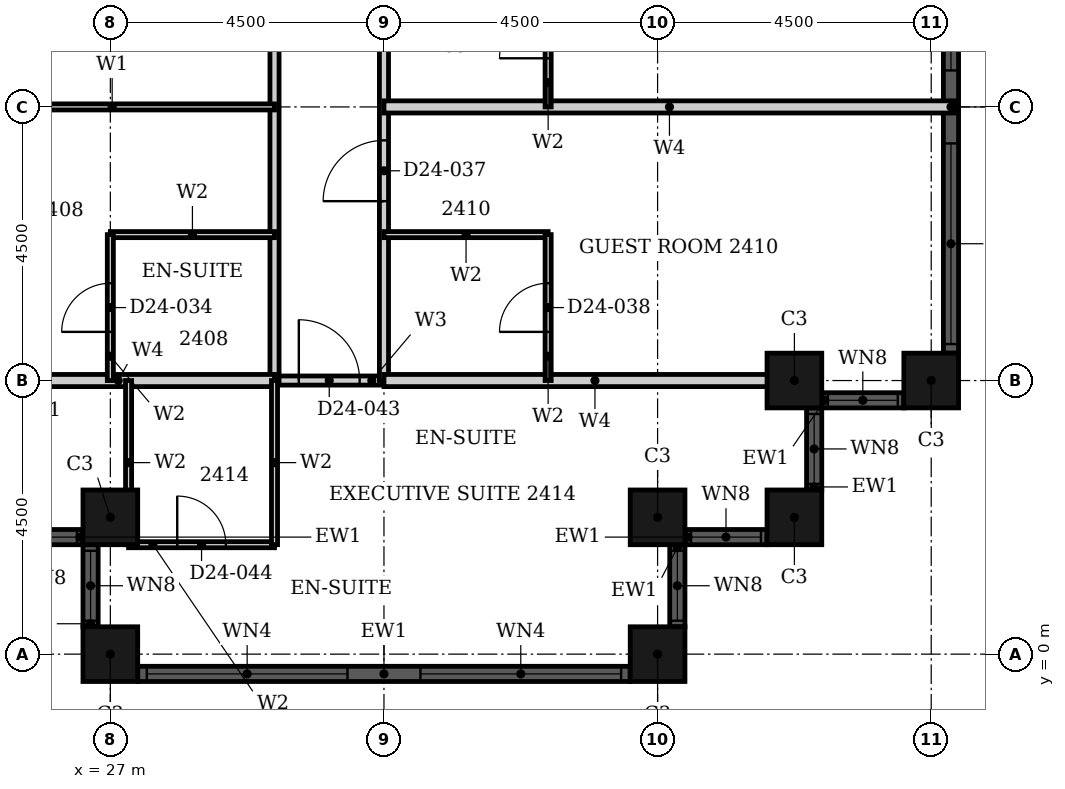
"""IFC4 building model, lengths in metres.
Left out: names, types, materials, properties, quantities, classifications, styles, units other than length and angle.
Written with IfcOpenShell. Run it as: python <this file> out.ifc"""

import sys

from ifc_helpers import new_model, si_unit, direction, frame, frame_2d, origin, origin_2d, place, context, subcontext, project, spatial, rectangle, hollow_rectangle, extrude, element, fill, save


model = new_model("IFC4")
c1 = context("Model", 3, precision=1e-05, world=origin(), true_north=direction((0.0, 1.0)))
c2 = subcontext(c1, "Body", "Model", "MODEL_VIEW")
j1 = project(units=[si_unit("LENGTHUNIT", "METRE"), si_unit("PLANEANGLEUNIT", "RADIAN")], contexts=[c1])
p1 = place(None, origin())
s1 = spatial("IfcSite", under=j1, at=p1, CompositionType="ELEMENT")
p2 = place(p1, origin())
s2 = spatial("IfcBuilding", under=s1, at=p2, CompositionType="ELEMENT")
p3 = place(p2, frame((0.0, 0.0, 100.8)))
s3 = spatial("IfcBuildingStorey", under=s2, at=p3, CompositionType="ELEMENT", Elevation=100.8)
for number, where, z_axis, x_axis in (
    (1, (27.0, 2.25, 0.0), (0.0, 0.0, 1.0), (1.0, 0.0, 0.0)),
    (2, (27.0, 0.0, 0.0), (0.0, 0.0, 1.0), (1.0, 0.0, 0.0)),
    (3, (36.0, 0.0, 0.0), (0.0, 0.0, 1.0), (1.0, 0.0, 0.0)),
    (4, (36.0, 2.25, 0.0), (0.0, 0.0, 1.0), (1.0, 0.0, 0.0)),
    (5, (38.25, 2.25, 0.0), (0.0, 0.0, 1.0), (1.0, 0.0, 0.0)),
    (6, (38.25, 4.5, 0.0), (0.0, 0.0, 1.0), (1.0, 0.0, 0.0)),
    (7, (40.5, 4.5, 0.0), (0.0, 0.0, 1.0), (1.0, 0.0, 0.0)),
):
    element("IfcColumn", number, at=place(p3, frame(where, z_axis=z_axis, x_axis=x_axis)), inside=s3, PredefinedType="COLUMN", context=c2, shape_type="SweptSolid", body=[
        extrude(hollow_rectangle(XDim=0.9, YDim=0.9, WallThickness=0.028, at=origin_2d()), origin(), (0.0, 0.0, 1.0), 3.6),
    ])
p4 = place(p3, frame((25.2, 1.925, 0.0), z_axis=(0.0, 0.0, 1.0), x_axis=(1.0, 0.0, 0.0)))
e8 = element("IfcWall", 8, at=p4, inside=s3, PredefinedType="SOLIDWALL", context=c2, shape_type="SweptSolid", body=[
    extrude(rectangle(XDim=1.35, YDim=0.25, at=frame_2d((0.675, 0.0))), origin(), (0.0, 0.0, 1.0), 3.6),
])
p5 = place(p4, frame((0.1, 0.0, 0.9)))
e9 = element("IfcOpeningElement", 9, at=p5, cuts=e8, PredefinedType="OPENING", context=c2, shape_type="SweptSolid", body=[
    extrude(rectangle(XDim=1.15, YDim=2.08, at=frame_2d((0.575, 1.04))), frame((0.0, 0.135, 0.0), z_axis=(0.0, -1.0, 0.0), x_axis=(1.0, 0.0, 0.0)), (0.0, 0.0, 1.0), 0.27),
])
p6 = place(p3, frame((26.675, 1.8, 0.0), z_axis=(0.0, 0.0, 1.0), x_axis=(0.0, -1.0, 0.0)))
e10 = element("IfcWall", 10, at=p6, inside=s3, PredefinedType="SOLIDWALL", context=c2, shape_type="SweptSolid", body=[
    extrude(rectangle(XDim=1.35, YDim=0.25, at=frame_2d((0.675, 0.0))), origin(), (0.0, 0.0, 1.0), 3.6),
])
p7 = place(p6, frame((0.1, 0.0, 0.9)))
e11 = element("IfcOpeningElement", 11, at=p7, cuts=e10, PredefinedType="OPENING", context=c2, shape_type="SweptSolid", body=[
    extrude(rectangle(XDim=1.15, YDim=2.08, at=frame_2d((0.575, 1.04))), frame((0.0, 0.135, 0.0), z_axis=(0.0, -1.0, 0.0), x_axis=(1.0, 0.0, 0.0)), (0.0, 0.0, 1.0), 0.27),
])
p8 = place(p3, frame((27.45, -0.325, 0.0), z_axis=(0.0, 0.0, 1.0), x_axis=(1.0, 0.0, 0.0)))
e12 = element("IfcWall", 12, at=p8, inside=s3, PredefinedType="SOLIDWALL", context=c2, shape_type="SweptSolid", body=[
    extrude(rectangle(XDim=8.1, YDim=0.25, at=frame_2d((4.05, 0.0))), origin(), (0.0, 0.0, 1.0), 3.6),
])
p9 = place(p8, frame((0.15, 0.0, 0.9)))
e13 = element("IfcOpeningElement", 13, at=p9, cuts=e12, PredefinedType="OPENING", context=c2, shape_type="SweptSolid", body=[
    extrude(rectangle(XDim=3.3, YDim=2.08, at=frame_2d((1.65, 1.04))), frame((0.0, 0.135, 0.0), z_axis=(0.0, -1.0, 0.0), x_axis=(1.0, 0.0, 0.0)), (0.0, 0.0, 1.0), 0.27),
])
p10 = place(p8, frame((4.65, 0.0, 0.9)))
e14 = element("IfcOpeningElement", 14, at=p10, cuts=e12, PredefinedType="OPENING", context=c2, shape_type="SweptSolid", body=[
    extrude(rectangle(XDim=3.3, YDim=2.08, at=frame_2d((1.65, 1.04))), frame((0.0, 0.135, 0.0), z_axis=(0.0, -1.0, 0.0), x_axis=(1.0, 0.0, 0.0)), (0.0, 0.0, 1.0), 0.27),
])
p11 = place(p3, frame((36.325, 0.45, 0.0), z_axis=(0.0, 0.0, 1.0), x_axis=(0.0, 1.0, 0.0)))
e15 = element("IfcWall", 15, at=p11, inside=s3, PredefinedType="SOLIDWALL", context=c2, shape_type="SweptSolid", body=[
    extrude(rectangle(XDim=1.35, YDim=0.25, at=frame_2d((0.675, 0.0))), origin(), (0.0, 0.0, 1.0), 3.6),
])
p12 = place(p11, frame((0.1, 0.0, 0.9)))
e16 = element("IfcOpeningElement", 16, at=p12, cuts=e15, PredefinedType="OPENING", context=c2, shape_type="SweptSolid", body=[
    extrude(rectangle(XDim=1.15, YDim=2.08, at=frame_2d((0.575, 1.04))), frame((0.0, 0.135, 0.0), z_axis=(0.0, -1.0, 0.0), x_axis=(1.0, 0.0, 0.0)), (0.0, 0.0, 1.0), 0.27),
])
p13 = place(p3, frame((36.45, 1.925, 0.0), z_axis=(0.0, 0.0, 1.0), x_axis=(1.0, 0.0, 0.0)))
e17 = element("IfcWall", 17, at=p13, inside=s3, PredefinedType="SOLIDWALL", context=c2, shape_type="SweptSolid", body=[
    extrude(rectangle(XDim=1.35, YDim=0.25, at=frame_2d((0.675, 0.0))), origin(), (0.0, 0.0, 1.0), 3.6),
])
p14 = place(p13, frame((0.1, 0.0, 0.9)))
e18 = element("IfcOpeningElement", 18, at=p14, cuts=e17, PredefinedType="OPENING", context=c2, shape_type="SweptSolid", body=[
    extrude(rectangle(XDim=1.15, YDim=2.08, at=frame_2d((0.575, 1.04))), frame((0.0, 0.135, 0.0), z_axis=(0.0, -1.0, 0.0), x_axis=(1.0, 0.0, 0.0)), (0.0, 0.0, 1.0), 0.27),
])
p15 = place(p3, frame((38.575, 2.7, 0.0), z_axis=(0.0, 0.0, 1.0), x_axis=(0.0, 1.0, 0.0)))
e19 = element("IfcWall", 19, at=p15, inside=s3, PredefinedType="SOLIDWALL", context=c2, shape_type="SweptSolid", body=[
    extrude(rectangle(XDim=1.35, YDim=0.25, at=frame_2d((0.675, 0.0))), origin(), (0.0, 0.0, 1.0), 3.6),
])
p16 = place(p15, frame((0.1, 0.0, 0.9)))
e20 = element("IfcOpeningElement", 20, at=p16, cuts=e19, PredefinedType="OPENING", context=c2, shape_type="SweptSolid", body=[
    extrude(rectangle(XDim=1.15, YDim=2.08, at=frame_2d((0.575, 1.04))), frame((0.0, 0.135, 0.0), z_axis=(0.0, -1.0, 0.0), x_axis=(1.0, 0.0, 0.0)), (0.0, 0.0, 1.0), 0.27),
])
p17 = place(p3, frame((38.7, 4.175, 0.0), z_axis=(0.0, 0.0, 1.0), x_axis=(1.0, 0.0, 0.0)))
e21 = element("IfcWall", 21, at=p17, inside=s3, PredefinedType="SOLIDWALL", context=c2, shape_type="SweptSolid", body=[
    extrude(rectangle(XDim=1.35, YDim=0.25, at=frame_2d((0.675, 0.0))), origin(), (0.0, 0.0, 1.0), 3.6),
])
p18 = place(p17, frame((0.1, 0.0, 0.9)))
e22 = element("IfcOpeningElement", 22, at=p18, cuts=e21, PredefinedType="OPENING", context=c2, shape_type="SweptSolid", body=[
    extrude(rectangle(XDim=1.15, YDim=2.08, at=frame_2d((0.575, 1.04))), frame((0.0, 0.135, 0.0), z_axis=(0.0, -1.0, 0.0), x_axis=(1.0, 0.0, 0.0)), (0.0, 0.0, 1.0), 0.27),
])
p19 = place(p3, frame((40.825, 4.95, 0.0), z_axis=(0.0, 0.0, 1.0), x_axis=(0.0, 1.0, 0.0)))
e23 = element("IfcWall", 23, at=p19, inside=s3, PredefinedType="SOLIDWALL", context=c2, shape_type="SweptSolid", body=[
    extrude(rectangle(XDim=8.1, YDim=0.25, at=frame_2d((4.05, 0.0))), origin(), (0.0, 0.0, 1.0), 3.6),
])
p20 = place(p19, frame((0.15, 0.0, 0.9)))
e24 = element("IfcOpeningElement", 24, at=p20, cuts=e23, PredefinedType="OPENING", context=c2, shape_type="SweptSolid", body=[
    extrude(rectangle(XDim=3.3, YDim=2.08, at=frame_2d((1.65, 1.04))), frame((0.0, 0.135, 0.0), z_axis=(0.0, -1.0, 0.0), x_axis=(1.0, 0.0, 0.0)), (0.0, 0.0, 1.0), 0.27),
])
p21 = place(p19, frame((4.65, 0.0, 0.9)))
e25 = element("IfcOpeningElement", 25, at=p21, cuts=e23, PredefinedType="OPENING", context=c2, shape_type="SweptSolid", body=[
    extrude(rectangle(XDim=3.3, YDim=2.08, at=frame_2d((1.65, 1.04))), frame((0.0, 0.135, 0.0), z_axis=(0.0, -1.0, 0.0), x_axis=(1.0, 0.0, 0.0)), (0.0, 0.0, 1.0), 0.27),
])
p22 = place(p3, frame((29.7, 4.5, 0.0), z_axis=(0.0, 0.0, 1.0), x_axis=(1.0, 0.0, 0.0)))
e26 = element("IfcWall", 26, at=p22, inside=s3, PredefinedType="PARTITIONING", context=c2, shape_type="SweptSolid", body=[
    extrude(rectangle(XDim=1.8, YDim=0.15, at=frame_2d((0.9, 0.0))), origin(), (0.0, 0.0, 1.0), 3.3),
])
p23 = place(p22, frame((0.4, 0.0, 0.0)))
e27 = element("IfcOpeningElement", 27, at=p23, cuts=e26, PredefinedType="OPENING", context=c2, shape_type="SweptSolid", body=[
    extrude(rectangle(XDim=1.0, YDim=2.1, at=frame_2d((0.5, 1.05))), frame((0.0, 0.085, 0.0), z_axis=(0.0, -1.0, 0.0), x_axis=(1.0, 0.0, 0.0)), (0.0, 0.0, 1.0), 0.17),
])
p24 = place(p3, frame((29.7, 4.5, 0.0), z_axis=(0.0, 0.0, 1.0), x_axis=(0.0, 1.0, 0.0)))
e28 = element("IfcWall", 28, at=p24, inside=s3, PredefinedType="PARTITIONING", context=c2, shape_type="SweptSolid", body=[
    extrude(rectangle(XDim=16.2, YDim=0.15, at=frame_2d((8.1, 0.0))), origin(), (0.0, 0.0, 1.0), 3.3),
])
p25 = place(p24, frame((6.25, 0.0, 0.0)))
e29 = element("IfcOpeningElement", 29, at=p25, cuts=e28, PredefinedType="OPENING", context=c2, shape_type="SweptSolid", body=[
    extrude(rectangle(XDim=1.0, YDim=2.1, at=frame_2d((0.5, 1.05))), frame((0.0, 0.085, 0.0), z_axis=(0.0, -1.0, 0.0), x_axis=(1.0, 0.0, 0.0)), (0.0, 0.0, 1.0), 0.17),
])
p26 = place(p3, frame((31.5, 4.5, 0.0), z_axis=(0.0, 0.0, 1.0), x_axis=(0.0, 1.0, 0.0)))
e30 = element("IfcWall", 30, at=p26, inside=s3, PredefinedType="PARTITIONING", context=c2, shape_type="SweptSolid", body=[
    extrude(rectangle(XDim=16.2, YDim=0.15, at=frame_2d((8.1, 0.0))), origin(), (0.0, 0.0, 1.0), 2.58),
])
p27 = place(p26, frame((7.45, 0.0, 0.0)))
e31 = element("IfcOpeningElement", 31, at=p27, cuts=e30, PredefinedType="OPENING", context=c2, shape_type="SweptSolid", body=[
    extrude(rectangle(XDim=1.0, YDim=2.1, at=frame_2d((0.5, 1.05))), frame((0.0, 0.085, 0.0), z_axis=(0.0, -1.0, 0.0), x_axis=(1.0, 0.0, 0.0)), (0.0, 0.0, 1.0), 0.17),
])
p28 = place(p26, frame((2.95, 0.0, 0.0)))
e32 = element("IfcOpeningElement", 32, at=p28, cuts=e30, PredefinedType="OPENING", context=c2, shape_type="SweptSolid", body=[
    extrude(rectangle(XDim=1.0, YDim=2.1, at=frame_2d((0.5, 1.05))), frame((0.0, 0.085, 0.0), z_axis=(0.0, -1.0, 0.0), x_axis=(1.0, 0.0, 0.0)), (0.0, 0.0, 1.0), 0.17),
])
p29 = place(p3, frame((22.11, 9.0, 0.0), z_axis=(0.0, 0.0, 1.0), x_axis=(1.0, 0.0, 0.0)))
e33 = element("IfcWall", 33, at=p29, inside=s3, PredefinedType="PARTITIONING", context=c2, shape_type="SweptSolid", body=[
    extrude(rectangle(XDim=7.59, YDim=0.1, at=frame_2d((3.795, 0.0))), origin(), (0.0, 0.0, 1.0), 3.3),
])
p30 = place(p29, frame((1.35, 0.0, 0.0)))
e34 = element("IfcOpeningElement", 34, at=p30, cuts=e33, PredefinedType="OPENING", context=c2, shape_type="SweptSolid", body=[
    extrude(rectangle(XDim=0.9, YDim=2.1, at=frame_2d((0.45, 1.05))), frame((0.0, 0.06, 0.0), z_axis=(0.0, -1.0, 0.0), x_axis=(1.0, 0.0, 0.0)), (0.0, 0.0, 1.0), 0.12),
])
p31 = place(p3, frame((31.5, 4.5, 0.0), z_axis=(0.0, 0.0, 1.0), x_axis=(1.0, 0.0, 0.0)))
e35 = element("IfcWall", 35, at=p31, inside=s3, PredefinedType="PARTITIONING", context=c2, shape_type="SweptSolid", body=[
    extrude(rectangle(XDim=6.94, YDim=0.2, at=frame_2d((3.47, 0.0))), origin(), (0.0, 0.0, 1.0), 3.3),
])
p32 = place(p3, frame((24.56, 4.5, 0.0), z_axis=(0.0, 0.0, 1.0), x_axis=(1.0, 0.0, 0.0)))
e36 = element("IfcWall", 36, at=p32, inside=s3, PredefinedType="PARTITIONING", context=c2, shape_type="SweptSolid", body=[
    extrude(rectangle(XDim=5.14, YDim=0.2, at=frame_2d((2.57, 0.0))), origin(), (0.0, 0.0, 1.0), 3.3),
])
p33 = place(p3, frame((31.5, 9.0, 0.0), z_axis=(0.0, 0.0, 1.0), x_axis=(1.0, 0.0, 0.0)))
e37 = element("IfcWall", 37, at=p33, inside=s3, PredefinedType="PARTITIONING", context=c2, shape_type="SweptSolid", body=[
    extrude(rectangle(XDim=9.39, YDim=0.2, at=frame_2d((4.695, 0.0))), origin(), (0.0, 0.0, 1.0), 3.3),
])
p34 = place(p3, frame((27.3, 1.8, 0.0), z_axis=(0.0, 0.0, 1.0), x_axis=(1.0, 0.0, 0.0)))
e38 = element("IfcWall", 38, at=p34, inside=s3, PredefinedType="PARTITIONING", context=c2, shape_type="SweptSolid", body=[
    extrude(rectangle(XDim=2.4, YDim=0.1, at=frame_2d((1.2, 0.0))), origin(), (0.0, 0.0, 1.0), 3.3),
])
p35 = place(p34, frame((0.8, 0.0, 0.0)))
e39 = element("IfcOpeningElement", 39, at=p35, cuts=e38, PredefinedType="OPENING", context=c2, shape_type="SweptSolid", body=[
    extrude(rectangle(XDim=0.8, YDim=2.1, at=frame_2d((0.4, 1.05))), frame((0.0, 0.06, 0.0), z_axis=(0.0, -1.0, 0.0), x_axis=(1.0, 0.0, 0.0)), (0.0, 0.0, 1.0), 0.12),
])
for number, where, z_axis, x_axis in (
    (40, (31.5, 6.9, 0.0), (0.0, 0.0, 1.0), (1.0, 0.0, 0.0)),
    (41, (27.0, 6.9, 0.0), (0.0, 0.0, 1.0), (1.0, 0.0, 0.0)),
):
    element("IfcWall", number, at=place(p3, frame(where, z_axis=z_axis, x_axis=x_axis)), inside=s3, PredefinedType="PARTITIONING", context=c2, shape_type="SweptSolid", body=[
        extrude(rectangle(XDim=2.7, YDim=0.1, at=frame_2d((1.35, 0.0))), origin(), (0.0, 0.0, 1.0), 3.3),
    ])
p36 = place(p3, frame((27.0, 4.5, 0.0), z_axis=(0.0, 0.0, 1.0), x_axis=(0.0, 1.0, 0.0)))
e42 = element("IfcWall", 42, at=p36, inside=s3, PredefinedType="PARTITIONING", context=c2, shape_type="SweptSolid", body=[
    extrude(rectangle(XDim=2.4, YDim=0.1, at=frame_2d((1.2, 0.0))), origin(), (0.0, 0.0, 1.0), 2.58),
])
p37 = place(p36, frame((0.8, 0.0, 0.0)))
e43 = element("IfcOpeningElement", 43, at=p37, cuts=e42, PredefinedType="OPENING", context=c2, shape_type="SweptSolid", body=[
    extrude(rectangle(XDim=0.8, YDim=2.1, at=frame_2d((0.4, 1.05))), frame((0.0, 0.06, 0.0), z_axis=(0.0, -1.0, 0.0), x_axis=(1.0, 0.0, 0.0)), (0.0, 0.0, 1.0), 0.12),
])
for number, where, z_axis, x_axis in (
    (44, (27.3, 1.8, 0.0), (0.0, 0.0, 1.0), (0.0, 1.0, 0.0)),
    (45, (29.7, 1.8, 0.0), (0.0, 0.0, 1.0), (0.0, 1.0, 0.0)),
):
    element("IfcWall", number, at=place(p3, frame(where, z_axis=z_axis, x_axis=x_axis)), inside=s3, PredefinedType="PARTITIONING", context=c2, shape_type="SweptSolid", body=[
        extrude(rectangle(XDim=2.7, YDim=0.1, at=frame_2d((1.35, 0.0))), origin(), (0.0, 0.0, 1.0), 3.3),
    ])
p38 = place(p3, frame((34.2, 9.0, 0.0), z_axis=(0.0, 0.0, 1.0), x_axis=(0.0, 1.0, 0.0)))
e46 = element("IfcWall", 46, at=p38, inside=s3, PredefinedType="PARTITIONING", context=c2, shape_type="SweptSolid", body=[
    extrude(rectangle(XDim=2.4, YDim=0.1, at=frame_2d((1.2, 0.0))), origin(), (0.0, 0.0, 1.0), 3.3),
])
p39 = place(p38, frame((0.8, 0.0, 0.0)))
e47 = element("IfcOpeningElement", 47, at=p39, cuts=e46, PredefinedType="OPENING", context=c2, shape_type="SweptSolid", body=[
    extrude(rectangle(XDim=0.8, YDim=2.1, at=frame_2d((0.4, 1.05))), frame((0.0, 0.06, 0.0), z_axis=(0.0, -1.0, 0.0), x_axis=(1.0, 0.0, 0.0)), (0.0, 0.0, 1.0), 0.12),
])
p40 = place(p3, frame((34.2, 4.5, 0.0), z_axis=(0.0, 0.0, 1.0), x_axis=(0.0, 1.0, 0.0)))
e48 = element("IfcWall", 48, at=p40, inside=s3, PredefinedType="PARTITIONING", context=c2, shape_type="SweptSolid", body=[
    extrude(rectangle(XDim=2.4, YDim=0.1, at=frame_2d((1.2, 0.0))), origin(), (0.0, 0.0, 1.0), 3.3),
])
p41 = place(p40, frame((0.8, 0.0, 0.0)))
e49 = element("IfcOpeningElement", 49, at=p41, cuts=e48, PredefinedType="OPENING", context=c2, shape_type="SweptSolid", body=[
    extrude(rectangle(XDim=0.8, YDim=2.1, at=frame_2d((0.4, 1.05))), frame((0.0, 0.06, 0.0), z_axis=(0.0, -1.0, 0.0), x_axis=(1.0, 0.0, 0.0)), (0.0, 0.0, 1.0), 0.12),
])
p42 = place(p5, origin())
e50 = element("IfcWindow", 50, at=p42, inside=s3, PartitioningType="SINGLE_PANEL", PredefinedType="WINDOW", context=c2, shape_type="SweptSolid", body=[
    extrude(rectangle(XDim=1.15, YDim=2.08, at=frame_2d((0.575, 1.04))), frame((0.0, 0.03, 0.0), z_axis=(0.0, -1.0, 0.0), x_axis=(1.0, 0.0, 0.0)), (0.0, 0.0, 1.0), 0.06),
])
fill(e9, e50)
p43 = place(p7, origin())
e51 = element("IfcWindow", 51, at=p43, inside=s3, PartitioningType="SINGLE_PANEL", PredefinedType="WINDOW", context=c2, shape_type="SweptSolid", body=[
    extrude(rectangle(XDim=1.15, YDim=2.08, at=frame_2d((0.575, 1.04))), frame((0.0, 0.03, 0.0), z_axis=(0.0, -1.0, 0.0), x_axis=(1.0, 0.0, 0.0)), (0.0, 0.0, 1.0), 0.06),
])
fill(e11, e51)
p44 = place(p9, origin())
e52 = element("IfcWindow", 52, at=p44, inside=s3, PartitioningType="SINGLE_PANEL", PredefinedType="WINDOW", context=c2, shape_type="SweptSolid", body=[
    extrude(rectangle(XDim=3.3, YDim=2.08, at=frame_2d((1.65, 1.04))), frame((0.0, 0.03, 0.0), z_axis=(0.0, -1.0, 0.0), x_axis=(1.0, 0.0, 0.0)), (0.0, 0.0, 1.0), 0.06),
])
fill(e13, e52)
p45 = place(p10, origin())
e53 = element("IfcWindow", 53, at=p45, inside=s3, PartitioningType="SINGLE_PANEL", PredefinedType="WINDOW", context=c2, shape_type="SweptSolid", body=[
    extrude(rectangle(XDim=3.3, YDim=2.08, at=frame_2d((1.65, 1.04))), frame((0.0, 0.03, 0.0), z_axis=(0.0, -1.0, 0.0), x_axis=(1.0, 0.0, 0.0)), (0.0, 0.0, 1.0), 0.06),
])
fill(e14, e53)
p46 = place(p12, origin())
e54 = element("IfcWindow", 54, at=p46, inside=s3, PartitioningType="SINGLE_PANEL", PredefinedType="WINDOW", context=c2, shape_type="SweptSolid", body=[
    extrude(rectangle(XDim=1.15, YDim=2.08, at=frame_2d((0.575, 1.04))), frame((0.0, 0.03, 0.0), z_axis=(0.0, -1.0, 0.0), x_axis=(1.0, 0.0, 0.0)), (0.0, 0.0, 1.0), 0.06),
])
fill(e16, e54)
p47 = place(p14, origin())
e55 = element("IfcWindow", 55, at=p47, inside=s3, PartitioningType="SINGLE_PANEL", PredefinedType="WINDOW", context=c2, shape_type="SweptSolid", body=[
    extrude(rectangle(XDim=1.15, YDim=2.08, at=frame_2d((0.575, 1.04))), frame((0.0, 0.03, 0.0), z_axis=(0.0, -1.0, 0.0), x_axis=(1.0, 0.0, 0.0)), (0.0, 0.0, 1.0), 0.06),
])
fill(e18, e55)
p48 = place(p16, origin())
e56 = element("IfcWindow", 56, at=p48, inside=s3, PartitioningType="SINGLE_PANEL", PredefinedType="WINDOW", context=c2, shape_type="SweptSolid", body=[
    extrude(rectangle(XDim=1.15, YDim=2.08, at=frame_2d((0.575, 1.04))), frame((0.0, 0.03, 0.0), z_axis=(0.0, -1.0, 0.0), x_axis=(1.0, 0.0, 0.0)), (0.0, 0.0, 1.0), 0.06),
])
fill(e20, e56)
p49 = place(p18, origin())
e57 = element("IfcWindow", 57, at=p49, inside=s3, PartitioningType="SINGLE_PANEL", PredefinedType="WINDOW", context=c2, shape_type="SweptSolid", body=[
    extrude(rectangle(XDim=1.15, YDim=2.08, at=frame_2d((0.575, 1.04))), frame((0.0, 0.03, 0.0), z_axis=(0.0, -1.0, 0.0), x_axis=(1.0, 0.0, 0.0)), (0.0, 0.0, 1.0), 0.06),
])
fill(e22, e57)
p50 = place(p20, origin())
e58 = element("IfcWindow", 58, at=p50, inside=s3, PartitioningType="SINGLE_PANEL", PredefinedType="WINDOW", context=c2, shape_type="SweptSolid", body=[
    extrude(rectangle(XDim=3.3, YDim=2.08, at=frame_2d((1.65, 1.04))), frame((0.0, 0.03, 0.0), z_axis=(0.0, -1.0, 0.0), x_axis=(1.0, 0.0, 0.0)), (0.0, 0.0, 1.0), 0.06),
])
fill(e24, e58)
p51 = place(p21, origin())
e59 = element("IfcWindow", 59, at=p51, inside=s3, PartitioningType="SINGLE_PANEL", PredefinedType="WINDOW", context=c2, shape_type="SweptSolid", body=[
    extrude(rectangle(XDim=3.3, YDim=2.08, at=frame_2d((1.65, 1.04))), frame((0.0, 0.03, 0.0), z_axis=(0.0, -1.0, 0.0), x_axis=(1.0, 0.0, 0.0)), (0.0, 0.0, 1.0), 0.06),
])
fill(e25, e59)
p52 = place(p37, origin())
e60 = element("IfcDoor", 60, at=p52, inside=s3, OperationType="SINGLE_SWING_LEFT", PredefinedType="DOOR", context=c2, shape_type="SweptSolid", body=[
    extrude(rectangle(XDim=0.8, YDim=2.1, at=frame_2d((0.4, 1.05))), frame((0.0, 0.025, 0.0), z_axis=(0.0, -1.0, 0.0), x_axis=(1.0, 0.0, 0.0)), (0.0, 0.0, 1.0), 0.05),
])
fill(e43, e60)
p53 = place(p39, origin())
e61 = element("IfcDoor", 61, at=p53, inside=s3, OperationType="SINGLE_SWING_RIGHT", PredefinedType="DOOR", context=c2, shape_type="SweptSolid", body=[
    extrude(rectangle(XDim=0.8, YDim=2.1, at=frame_2d((0.4, 1.05))), frame((0.0, 0.025, 0.0), z_axis=(0.0, -1.0, 0.0), x_axis=(1.0, 0.0, 0.0)), (0.0, 0.0, 1.0), 0.05),
])
fill(e47, e61)
p54 = place(p28, origin())
e62 = element("IfcDoor", 62, at=p54, inside=s3, OperationType="SINGLE_SWING_RIGHT", PredefinedType="DOOR", context=c2, shape_type="SweptSolid", body=[
    extrude(rectangle(XDim=1.0, YDim=2.1, at=frame_2d((0.5, 1.05))), frame((0.0, 0.025, 0.0), z_axis=(0.0, -1.0, 0.0), x_axis=(1.0, 0.0, 0.0)), (0.0, 0.0, 1.0), 0.05),
])
fill(e32, e62)
p55 = place(p41, origin())
e63 = element("IfcDoor", 63, at=p55, inside=s3, OperationType="SINGLE_SWING_LEFT", PredefinedType="DOOR", context=c2, shape_type="SweptSolid", body=[
    extrude(rectangle(XDim=0.8, YDim=2.1, at=frame_2d((0.4, 1.05))), frame((0.0, 0.025, 0.0), z_axis=(0.0, -1.0, 0.0), x_axis=(1.0, 0.0, 0.0)), (0.0, 0.0, 1.0), 0.05),
])
fill(e49, e63)
p56 = place(p23, origin())
e64 = element("IfcDoor", 64, at=p56, inside=s3, OperationType="SINGLE_SWING_RIGHT", PredefinedType="DOOR", context=c2, shape_type="SweptSolid", body=[
    extrude(rectangle(XDim=1.0, YDim=2.1, at=frame_2d((0.5, 1.05))), frame((0.0, 0.025, 0.0), z_axis=(0.0, -1.0, 0.0), x_axis=(1.0, 0.0, 0.0)), (0.0, 0.0, 1.0), 0.05),
])
fill(e27, e64)
p57 = place(p35, origin())
e65 = element("IfcDoor", 65, at=p57, inside=s3, OperationType="SINGLE_SWING_RIGHT", PredefinedType="DOOR", context=c2, shape_type="SweptSolid", body=[
    extrude(rectangle(XDim=0.8, YDim=2.1, at=frame_2d((0.4, 1.05))), frame((0.0, 0.025, 0.0), z_axis=(0.0, -1.0, 0.0), x_axis=(1.0, 0.0, 0.0)), (0.0, 0.0, 1.0), 0.05),
])
fill(e39, e65)
save(model, sys.argv[1])
